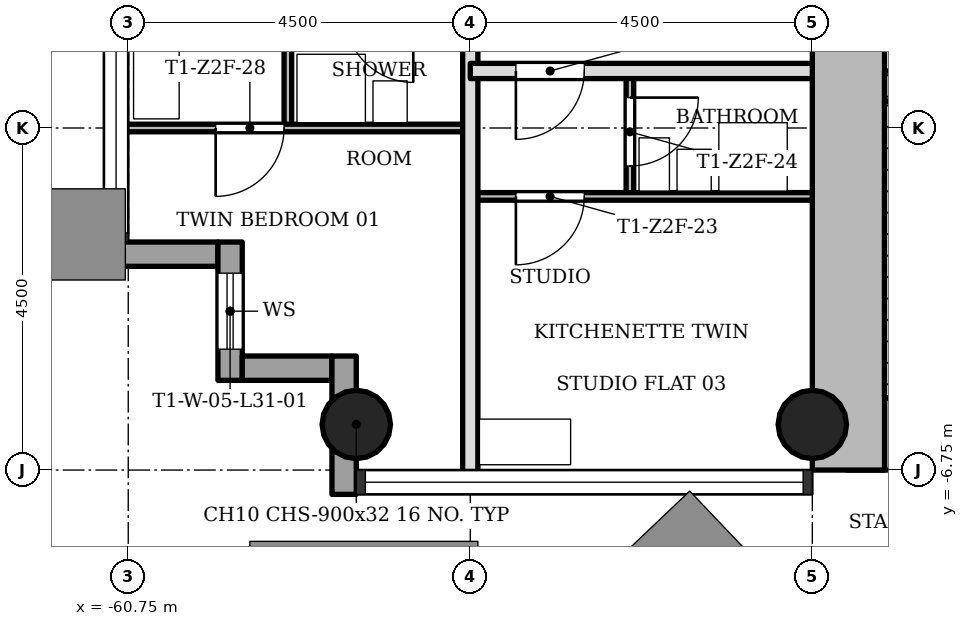
"""IFC4 building model, lengths in metres.
Left out: names, types, materials, properties, quantities, classifications, styles, units other than length and angle.
Written with IfcOpenShell. Run it as: python <this file> out.ifc"""

import sys

from ifc_helpers import new_model, si_unit, direction, frame, frame_2d, origin, origin_2d, place, context, subcontext, project, spatial, rectangle, hollow_circle, extrude, element, fill, save


model = new_model("IFC4")
c1 = context("Model", 3, precision=1e-05, world=origin(), true_north=direction((0.0, 1.0)))
c2 = subcontext(c1, "Body", "Model", "MODEL_VIEW")
j1 = project(units=[si_unit("LENGTHUNIT", "METRE"), si_unit("PLANEANGLEUNIT", "RADIAN")], contexts=[c1])
p1 = place(None, origin())
s1 = spatial("IfcSite", under=j1, at=p1, CompositionType="ELEMENT")
p2 = place(p1, origin())
s2 = spatial("IfcBuilding", under=s1, at=p2, CompositionType="ELEMENT")
p3 = place(p2, frame((0.0, 0.0, 114.0)))
s3 = spatial("IfcBuildingStorey", under=s2, at=p3, CompositionType="ELEMENT", Elevation=114.0)
p4 = place(p3, frame((-51.298, -6.275, 0.0), z_axis=(0.0, 0.0, 1.0), x_axis=(1.0, 0.0, 0.0)))
e1 = element("IfcWall", 1, at=p4, inside=s3, PredefinedType="SHEAR", context=c2, shape_type="SweptSolid", body=[
    extrude(rectangle(XDim=8.696, YDim=0.95, at=frame_2d((4.348, 0.0))), origin(), (0.0, 0.0, 1.0), 3.4),
])
p5 = place(p3, frame((-51.275, 5.8, 0.0), z_axis=(0.0, 0.0, 1.0), x_axis=(0.0, -1.0, 0.0)))
e2 = element("IfcWall", 2, at=p5, inside=s3, PredefinedType="SHEAR", context=c2, shape_type="SweptSolid", body=[
    extrude(rectangle(XDim=12.55, YDim=0.95, at=frame_2d((6.275, 0.0))), origin(), (0.0, 0.0, 1.0), 3.4),
])
p6 = place(p5, frame((4.9, 0.0, 0.0)))
e3 = element("IfcOpeningElement", 3, at=p6, cuts=e2, PredefinedType="OPENING", context=c2, shape_type="SweptSolid", body=[
    extrude(rectangle(XDim=1.8, YDim=2.1, at=frame_2d((0.9, 1.05))), frame((0.0, 0.485, 0.0), z_axis=(0.0, -1.0, 0.0), x_axis=(1.0, 0.0, 0.0)), (0.0, 0.0, 1.0), 0.97),
])
p7 = place(p3, frame((-50.8, -1.7, 0.0), z_axis=(0.0, 0.0, 1.0), x_axis=(1.0, 0.0, 0.0)))
e4 = element("IfcWall", 4, at=p7, inside=s3, PredefinedType="SHEAR", context=c2, shape_type="SweptSolid", body=[
    extrude(rectangle(XDim=7.1, YDim=0.4, at=frame_2d((3.55, 0.0))), origin(), (0.0, 0.0, 1.0), 3.4),
])
p8 = place(p7, frame((5.5, 0.0, 0.0)))
e5 = element("IfcOpeningElement", 5, at=p8, cuts=e4, PredefinedType="OPENING", context=c2, shape_type="SweptSolid", body=[
    extrude(rectangle(XDim=0.9, YDim=2.1, at=frame_2d((0.45, 1.05))), frame((0.0, 0.21, 0.0), z_axis=(0.0, -1.0, 0.0), x_axis=(1.0, 0.0, 0.0)), (0.0, 0.0, 1.0), 0.42),
])
for number, where, z_axis, x_axis in (
    (6, (-51.75, -6.15, 0.0), (0.0, 0.0, 1.0), (1.0, 0.0, 0.0)),
    (7, (-57.75, -6.15, 0.0), (0.0, 0.0, 1.0), (1.0, 0.0, 0.0)),
):
    element("IfcColumn", number, at=place(p3, frame(where, z_axis=z_axis, x_axis=x_axis)), inside=s3, PredefinedType="COLUMN", context=c2, shape_type="SweptSolid", body=[
        extrude(hollow_circle(Radius=0.45, WallThickness=0.032, at=origin_2d()), origin(), (0.0, 0.0, 1.0), 3.4),
    ])
p9 = place(p3, frame((-61.07, -3.91, -0.3), z_axis=(0.0, 0.0, 1.0), x_axis=(1.0, 0.0, 0.0)))
e8 = element("IfcWall", 8, at=p9, inside=s3, PredefinedType="STANDARD", context=c2, shape_type="SweptSolid", body=[
    extrude(rectangle(XDim=1.5, YDim=0.32, at=frame_2d((0.75, 0.0))), origin(), (0.0, 0.0, 1.0), 3.4),
])
p10 = place(p3, frame((-59.41, -3.75, -0.3), z_axis=(0.0, 0.0, 1.0), x_axis=(0.0, -1.0, 0.0)))
e9 = element("IfcWall", 9, at=p10, inside=s3, PredefinedType="STANDARD", context=c2, shape_type="SweptSolid", body=[
    extrude(rectangle(XDim=1.82, YDim=0.32, at=frame_2d((0.91, 0.0))), origin(), (0.0, 0.0, 1.0), 3.4),
])
p11 = place(p10, frame((0.41, 0.0, 1.2)))
e10 = element("IfcOpeningElement", 10, at=p11, cuts=e9, PredefinedType="OPENING", context=c2, shape_type="SweptSolid", body=[
    extrude(rectangle(XDim=1.0, YDim=1.5, at=frame_2d((0.5, 0.75))), frame((0.0, 0.17, 0.0), z_axis=(0.0, -1.0, 0.0), x_axis=(1.0, 0.0, 0.0)), (0.0, 0.0, 1.0), 0.34),
])
p12 = place(p3, frame((-59.25, -5.41, -0.3), z_axis=(0.0, 0.0, 1.0), x_axis=(1.0, 0.0, 0.0)))
e11 = element("IfcWall", 11, at=p12, inside=s3, PredefinedType="STANDARD", context=c2, shape_type="SweptSolid", body=[
    extrude(rectangle(XDim=1.18, YDim=0.32, at=frame_2d((0.59, 0.0))), origin(), (0.0, 0.0, 1.0), 3.4),
])
p13 = place(p3, frame((-57.91, -5.25, -0.3), z_axis=(0.0, 0.0, 1.0), x_axis=(0.0, -1.0, 0.0)))
e12 = element("IfcWall", 12, at=p13, inside=s3, PredefinedType="STANDARD", context=c2, shape_type="SweptSolid", body=[
    extrude(rectangle(XDim=1.82, YDim=0.32, at=frame_2d((0.91, 0.0))), origin(), (0.0, 0.0, 1.0), 3.4),
])
p14 = place(p3, frame((-58.65, -2.25, 0.0), z_axis=(0.0, 0.0, 1.0), x_axis=(0.0, 1.0, 0.0)))
e13 = element("IfcWall", 13, at=p14, inside=s3, PredefinedType="PARTITIONING", context=c2, shape_type="SweptSolid", body=[
    extrude(rectangle(XDim=1.5, YDim=0.1, at=frame_2d((0.75, 0.0))), origin(), (0.0, 0.0, 1.0), 3.0),
])
p15 = place(p3, frame((-56.25, -6.85, 0.0), z_axis=(0.0, 0.0, 1.0), x_axis=(0.0, 1.0, 0.0)))
e14 = element("IfcWall", 14, at=p15, inside=s3, PredefinedType="SOLIDWALL", context=c2, shape_type="SweptSolid", body=[
    extrude(rectangle(XDim=13.7, YDim=0.2, at=frame_2d((6.85, 0.0))), origin(), (0.0, 0.0, 1.0), 3.0),
])
p16 = place(p15, frame((6.4, 0.0, 0.0)))
e15 = element("IfcOpeningElement", 15, at=p16, cuts=e14, PredefinedType="OPENING", context=c2, shape_type="SweptSolid", body=[
    extrude(rectangle(XDim=0.9, YDim=2.1, at=frame_2d((0.45, 1.05))), frame((0.0, 0.11, 0.0), z_axis=(0.0, -1.0, 0.0), x_axis=(1.0, 0.0, 0.0)), (0.0, 0.0, 1.0), 0.22),
])
p17 = place(p3, frame((-54.15, -3.15, 0.0), z_axis=(0.0, 0.0, 1.0), x_axis=(0.0, 1.0, 0.0)))
e16 = element("IfcWall", 16, at=p17, inside=s3, PredefinedType="PARTITIONING", context=c2, shape_type="SweptSolid", body=[
    extrude(rectangle(XDim=1.65, YDim=0.1, at=frame_2d((0.825, 0.0))), origin(), (0.0, 0.0, 1.0), 3.0),
])
p18 = place(p17, frame((0.4, 0.0, 0.0)))
e17 = element("IfcOpeningElement", 17, at=p18, cuts=e16, PredefinedType="OPENING", context=c2, shape_type="SweptSolid", body=[
    extrude(rectangle(XDim=0.9, YDim=2.1, at=frame_2d((0.45, 1.05))), frame((0.0, 0.06, 0.0), z_axis=(0.0, -1.0, 0.0), x_axis=(1.0, 0.0, 0.0)), (0.0, 0.0, 1.0), 0.12),
])
p19 = place(p3, frame((-56.25, -3.15, 0.0), z_axis=(0.0, 0.0, 1.0), x_axis=(1.0, 0.0, 0.0)))
e18 = element("IfcWall", 18, at=p19, inside=s3, PredefinedType="PARTITIONING", context=c2, shape_type="SweptSolid", body=[
    extrude(rectangle(XDim=4.5, YDim=0.1, at=frame_2d((2.25, 0.0))), origin(), (0.0, 0.0, 1.0), 3.0),
])
p20 = place(p19, frame((0.6, 0.0, 0.0)))
e19 = element("IfcOpeningElement", 19, at=p20, cuts=e18, PredefinedType="OPENING", context=c2, shape_type="SweptSolid", body=[
    extrude(rectangle(XDim=0.9, YDim=2.1, at=frame_2d((0.45, 1.05))), frame((0.0, 0.06, 0.0), z_axis=(0.0, -1.0, 0.0), x_axis=(1.0, 0.0, 0.0)), (0.0, 0.0, 1.0), 0.12),
])
p21 = place(p3, frame((-60.85, -2.25, 0.0), z_axis=(0.0, 0.0, 1.0), x_axis=(1.0, 0.0, 0.0)))
e20 = element("IfcWall", 20, at=p21, inside=s3, PredefinedType="PARTITIONING", context=c2, shape_type="SweptSolid", body=[
    extrude(rectangle(XDim=4.6, YDim=0.1, at=frame_2d((2.3, 0.0))), origin(), (0.0, 0.0, 1.0), 3.0),
])
p22 = place(p21, frame((1.25, 0.0, 0.0)))
e21 = element("IfcOpeningElement", 21, at=p22, cuts=e20, PredefinedType="OPENING", context=c2, shape_type="SweptSolid", body=[
    extrude(rectangle(XDim=0.9, YDim=2.1, at=frame_2d((0.45, 1.05))), frame((0.0, 0.06, 0.0), z_axis=(0.0, -1.0, 0.0), x_axis=(1.0, 0.0, 0.0)), (0.0, 0.0, 1.0), 0.12),
])
p23 = place(p3, frame((-56.25, -1.5, 0.0), z_axis=(0.0, 0.0, 1.0), x_axis=(1.0, 0.0, 0.0)))
e22 = element("IfcWall", 22, at=p23, inside=s3, PredefinedType="SOLIDWALL", context=c2, shape_type="SweptSolid", body=[
    extrude(rectangle(XDim=4.5, YDim=0.2, at=frame_2d((2.25, 0.0))), origin(), (0.0, 0.0, 1.0), 3.0),
])
p24 = place(p23, frame((0.6, 0.0, 0.0)))
e23 = element("IfcOpeningElement", 23, at=p24, cuts=e22, PredefinedType="OPENING", context=c2, shape_type="SweptSolid", body=[
    extrude(rectangle(XDim=0.9, YDim=2.1, at=frame_2d((0.45, 1.05))), frame((0.0, 0.11, 0.0), z_axis=(0.0, -1.0, 0.0), x_axis=(1.0, 0.0, 0.0)), (0.0, 0.0, 1.0), 0.22),
])
p25 = place(p3, frame((-50.675, -1.9, 0.0), z_axis=(0.0, 0.0, 1.0), x_axis=(0.0, -1.0, 0.0)))
e24 = element("IfcWall", 24, at=p25, inside=s3, PredefinedType="SHEAR", context=c2, shape_type="SweptSolid", body=[
    extrude(rectangle(XDim=3.9, YDim=0.25, at=frame_2d((1.95, 0.0))), origin(), (0.0, 0.0, 1.0), 3.4),
])
p26 = place(p24, origin())
e25 = element("IfcDoor", 25, at=p26, inside=s3, OperationType="SINGLE_SWING_LEFT", PredefinedType="DOOR", context=c2, shape_type="SweptSolid", body=[
    extrude(rectangle(XDim=0.9, YDim=2.1, at=frame_2d((0.45, 1.05))), frame((0.0, 0.025, 0.0), z_axis=(0.0, -1.0, 0.0), x_axis=(1.0, 0.0, 0.0)), (0.0, 0.0, 1.0), 0.05),
])
fill(e23, e25)
p27 = place(p20, origin())
e26 = element("IfcDoor", 26, at=p27, inside=s3, OperationType="SINGLE_SWING_LEFT", PredefinedType="DOOR", context=c2, shape_type="SweptSolid", body=[
    extrude(rectangle(XDim=0.9, YDim=2.1, at=frame_2d((0.45, 1.05))), frame((0.0, 0.025, 0.0), z_axis=(0.0, -1.0, 0.0), x_axis=(1.0, 0.0, 0.0)), (0.0, 0.0, 1.0), 0.05),
])
fill(e19, e26)
p28 = place(p18, origin())
e27 = element("IfcDoor", 27, at=p28, inside=s3, OperationType="SINGLE_SWING_RIGHT", PredefinedType="DOOR", context=c2, shape_type="SweptSolid", body=[
    extrude(rectangle(XDim=0.9, YDim=2.1, at=frame_2d((0.45, 1.05))), frame((0.0, 0.025, 0.0), z_axis=(0.0, -1.0, 0.0), x_axis=(1.0, 0.0, 0.0)), (0.0, 0.0, 1.0), 0.05),
])
fill(e17, e27)
p29 = place(p22, origin())
e28 = element("IfcDoor", 28, at=p29, inside=s3, OperationType="SINGLE_SWING_LEFT", PredefinedType="DOOR", context=c2, shape_type="SweptSolid", body=[
    extrude(rectangle(XDim=0.9, YDim=2.1, at=frame_2d((0.45, 1.05))), frame((0.0, 0.025, 0.0), z_axis=(0.0, -1.0, 0.0), x_axis=(1.0, 0.0, 0.0)), (0.0, 0.0, 1.0), 0.05),
])
fill(e21, e28)
p30 = place(p11, origin())
e29 = element("IfcWindow", 29, at=p30, inside=s3, PartitioningType="SINGLE_PANEL", PredefinedType="WINDOW", context=c2, shape_type="SweptSolid", body=[
    extrude(rectangle(XDim=1.0, YDim=1.5, at=frame_2d((0.5, 0.75))), frame((0.0, 0.03, 0.0), z_axis=(0.0, -1.0, 0.0), x_axis=(1.0, 0.0, 0.0)), (0.0, 0.0, 1.0), 0.06),
])
fill(e10, e29)
save(model, sys.argv[1])
